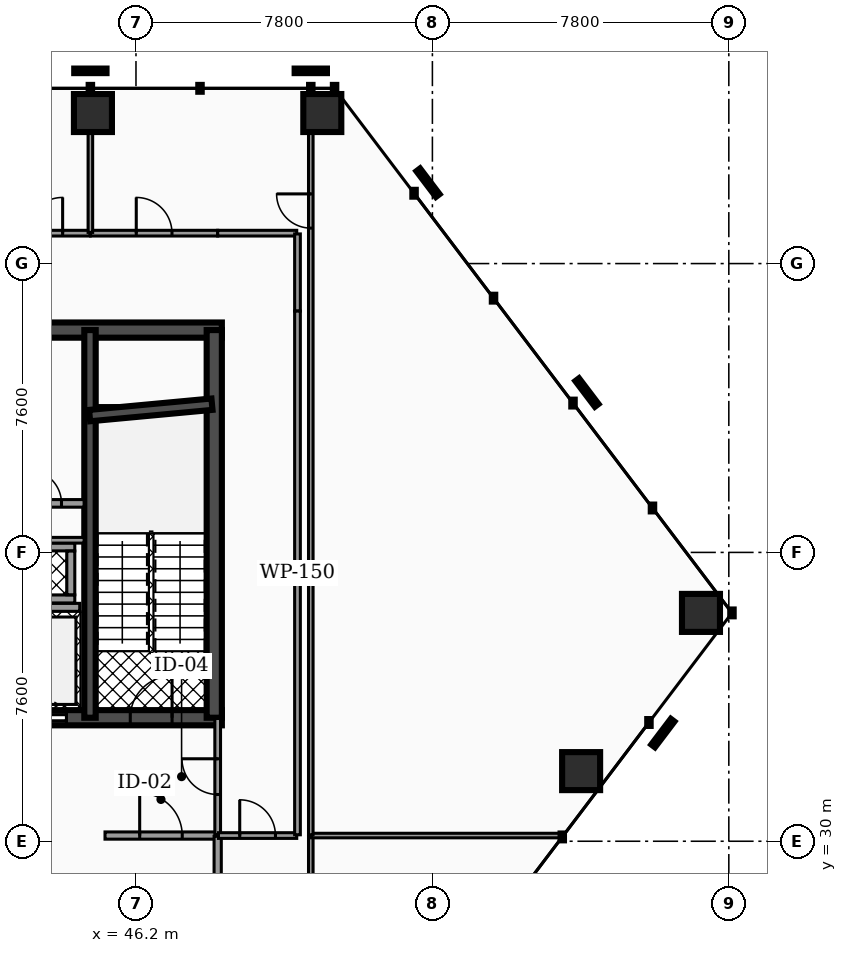
"""IFC4 building model, lengths in metres.
Left out: names, types, materials, properties, quantities, classifications, styles, units other than length and angle.
Written with IfcOpenShell. Run it as: python <this file> out.ifc"""

import sys

from ifc_helpers import new_model, si_unit, direction, frame, frame_2d, origin, origin_2d, place, context, subcontext, project, spatial, rectangle, hollow_rectangle, extrude, element, fill, save


model = new_model("IFC4")
c1 = context("Model", 3, precision=1e-05, world=origin(), true_north=direction((0.0, 1.0)))
c2 = subcontext(c1, "Body", "Model", "MODEL_VIEW")
j1 = project(units=[si_unit("LENGTHUNIT", "METRE"), si_unit("PLANEANGLEUNIT", "RADIAN")], contexts=[c1])
p1 = place(None, origin())
s1 = spatial("IfcSite", under=j1, at=p1, CompositionType="ELEMENT")
p2 = place(p1, origin())
s2 = spatial("IfcBuilding", under=s1, at=p2, CompositionType="ELEMENT")
p3 = place(p2, frame((0.0, 0.0, 68.34)))
s3 = spatial("IfcBuildingStorey", under=s2, at=p3, CompositionType="ELEMENT", Elevation=68.34)
p4 = place(p3, frame((28.4, 43.45, 0.0), z_axis=(0.0, 0.0, 1.0), x_axis=(1.0, 0.0, 0.0)))
e1 = element("IfcWall", 1, at=p4, inside=s3, PredefinedType="SHEAR", context=c2, shape_type="SweptSolid", body=[
    extrude(rectangle(XDim=20.06, YDim=0.4, at=frame_2d((10.03, 0.0))), origin(), (0.0, 0.0, 1.0), 3.82),
])
p5 = place(p3, frame((28.4, 33.25, 0.0), z_axis=(0.0, 0.0, 1.0), x_axis=(1.0, 0.0, 0.0)))
e2 = element("IfcWall", 2, at=p5, inside=s3, PredefinedType="SHEAR", context=c2, shape_type="SweptSolid", body=[
    extrude(rectangle(XDim=20.06, YDim=0.4, at=frame_2d((10.03, 0.0))), origin(), (0.0, 0.0, 1.0), 3.82),
])
p6 = place(p5, frame((4.03, 0.0, 0.0)))
e3 = element("IfcOpeningElement", 3, at=p6, cuts=e2, PredefinedType="OPENING", context=c2, shape_type="SweptSolid", body=[
    extrude(rectangle(XDim=1.1, YDim=2.15, at=frame_2d((0.55, 1.075))), frame((0.0, 0.21, 0.0), z_axis=(0.0, -1.0, 0.0), x_axis=(1.0, 0.0, 0.0)), (0.0, 0.0, 1.0), 0.42),
])
p7 = place(p5, frame((14.87, 0.0, 0.0)))
e4 = element("IfcOpeningElement", 4, at=p7, cuts=e2, PredefinedType="OPENING", context=c2, shape_type="SweptSolid", body=[
    extrude(rectangle(XDim=1.1, YDim=2.15, at=frame_2d((0.55, 1.075))), frame((0.0, 0.21, 0.0), z_axis=(0.0, -1.0, 0.0), x_axis=(1.0, 0.0, 0.0)), (0.0, 0.0, 1.0), 0.42),
])
p8 = place(p5, frame((1.31, 0.0, 0.0)))
e5 = element("IfcOpeningElement", 5, at=p8, cuts=e2, PredefinedType="OPENING", context=c2, shape_type="SweptSolid", body=[
    extrude(rectangle(XDim=1.1, YDim=2.2, at=frame_2d((0.55, 1.1))), frame((0.0, 0.21, 0.0), z_axis=(0.0, -1.0, 0.0), x_axis=(1.0, 0.0, 0.0)), (0.0, 0.0, 1.0), 0.42),
])
p9 = place(p5, frame((9.44, 0.0, 0.0)))
e6 = element("IfcOpeningElement", 6, at=p9, cuts=e2, PredefinedType="OPENING", context=c2, shape_type="SweptSolid", body=[
    extrude(rectangle(XDim=1.12, YDim=2.05, at=frame_2d((0.56, 1.025))), frame((0.0, 0.21, 0.0), z_axis=(0.0, -1.0, 0.0), x_axis=(1.0, 0.0, 0.0)), (0.0, 0.0, 1.0), 0.42),
])
p10 = place(p5, frame((17.65, 0.0, 0.0)))
e7 = element("IfcOpeningElement", 7, at=p10, cuts=e2, PredefinedType="OPENING", context=c2, shape_type="SweptSolid", body=[
    extrude(rectangle(XDim=1.1, YDim=2.2, at=frame_2d((0.55, 1.1))), frame((0.0, 0.21, 0.0), z_axis=(0.0, -1.0, 0.0), x_axis=(1.0, 0.0, 0.0)), (0.0, 0.0, 1.0), 0.42),
])
p11 = place(p3, frame((44.99, 33.25, 0.0), z_axis=(0.0, 0.0, 1.0), x_axis=(0.0, 1.0, 0.0)))
e8 = element("IfcWall", 8, at=p11, inside=s3, PredefinedType="SHEAR", context=c2, shape_type="SweptSolid", body=[
    extrude(rectangle(XDim=10.2, YDim=0.3, at=frame_2d((5.1, 0.0))), origin(), (0.0, 0.0, 1.0), 3.82),
])
p12 = place(p3, frame((48.26, 33.25, 0.0), z_axis=(0.0, 0.0, 1.0), x_axis=(0.0, 1.0, 0.0)))
e9 = element("IfcWall", 9, at=p12, inside=s3, PredefinedType="SHEAR", context=c2, shape_type="SweptSolid", body=[
    extrude(rectangle(XDim=10.2, YDim=0.4, at=frame_2d((5.1, 0.0))), origin(), (0.0, 0.0, 1.0), 3.82),
])
p13 = place(p3, frame((44.98, 41.2, 0.0), z_axis=(0.0, 0.0, 1.0), x_axis=(0.995686468965, 0.09278176286, 0.0)))
e10 = element("IfcWall", 10, at=p13, inside=s3, PredefinedType="SHEAR", context=c2, shape_type="SweptSolid", body=[
    extrude(rectangle(XDim=3.234, YDim=0.3, at=frame_2d((1.617, 0.0))), origin(), (0.0, 0.0, 1.0), 3.82),
])
p14 = place(p3, frame((51.103, 49.161, 0.0), z_axis=(0.091314571576, -0.020299197444, 0.995615182488), x_axis=(0.217002484606, 0.976171051443, 0.0)))
e11 = element("IfcColumn", 11, at=p14, inside=s3, PredefinedType="COLUMN", context=c2, shape_type="SweptSolid", body=[
    extrude(hollow_rectangle(XDim=1.0, YDim=1.0, WallThickness=0.05, at=origin_2d()), origin(), (0.0, 0.0, 1.0), 3.837),
])
p15 = place(p3, frame((45.067, 49.161, 0.0), z_axis=(0.043921338249, -0.020364690264, 0.998827410235), x_axis=(0.42064633694, 0.907224701614, 0.0)))
e12 = element("IfcColumn", 12, at=p15, inside=s3, PredefinedType="COLUMN", context=c2, shape_type="SweptSolid", body=[
    extrude(hollow_rectangle(XDim=1.0, YDim=1.0, WallThickness=0.05, at=origin_2d()), origin(), (0.0, 0.0, 1.0), 3.824),
])
p16 = place(p3, frame((57.914, 31.845, 0.0), z_axis=(-0.001531950294, 0.050873516023, 0.998703929348), x_axis=(-0.999546914037, -0.03009927972, 0.0)))
e13 = element("IfcColumn", 13, at=p16, inside=s3, PredefinedType="COLUMN", context=c2, shape_type="SweptSolid", body=[
    extrude(hollow_rectangle(XDim=1.0, YDim=1.0, WallThickness=0.05, at=origin_2d()), origin(), (0.0, 0.0, 1.0), 3.825),
])
p17 = place(p3, frame((61.067, 36.008, 0.0), z_axis=(0.018031703959, 0.076523238356, 0.996904735491), x_axis=(-0.973342715599, 0.229355527489, 0.0)))
e14 = element("IfcColumn", 14, at=p17, inside=s3, PredefinedType="COLUMN", context=c2, shape_type="SweptSolid", body=[
    extrude(hollow_rectangle(XDim=1.0, YDim=1.0, WallThickness=0.05, at=origin_2d()), origin(), (0.0, 0.0, 1.0), 3.832),
])
p18 = place(p3, frame((42.92, 36.155, 0.0), z_axis=(0.0, 0.0, 1.0), x_axis=(1.0, 0.0, 0.0)))
e15 = element("IfcWall", 15, at=p18, inside=s3, PredefinedType="SOLIDWALL", context=c2, shape_type="SweptSolid", body=[
    extrude(rectangle(XDim=1.8, YDim=0.21, at=frame_2d((0.9, 0.0))), origin(), (0.0, 0.0, 1.0), 2.792),
])
for number, where, z_axis, x_axis in (
    (16, (42.99, 36.375, 0.0), (0.0, 0.0, 1.0), (1.0, 0.0, 0.0)),
    (17, (42.99, 37.745, 0.0), (0.0, 0.0, 1.0), (1.0, 0.0, 0.0)),
):
    element("IfcWall", number, at=place(p3, frame(where, z_axis=z_axis, x_axis=x_axis)), inside=s3, PredefinedType="SOLIDWALL", context=c2, shape_type="SweptSolid", body=[
        extrude(rectangle(XDim=1.6, YDim=0.21, at=frame_2d((0.8, 0.0))), origin(), (0.0, 0.0, 1.0), 3.82),
    ])
p19 = place(p3, frame((44.485, 36.485, 0.0), z_axis=(0.0, 0.0, 1.0), x_axis=(0.0, 1.0, 0.0)))
e18 = element("IfcWall", 18, at=p19, inside=s3, PredefinedType="SOLIDWALL", context=c2, shape_type="SweptSolid", body=[
    extrude(rectangle(XDim=1.15, YDim=0.21, at=frame_2d((0.575, 0.0))), origin(), (0.0, 0.0, 1.0), 3.82),
])
p20 = place(p3, frame((42.765, 38.89, 0.0), z_axis=(0.0, 0.0, 1.0), x_axis=(1.0, 0.0, 0.0)))
e19 = element("IfcWall", 19, at=p20, inside=s3, PredefinedType="PARTITIONING", context=c2, shape_type="SweptSolid", body=[
    extrude(rectangle(XDim=2.07, YDim=0.2, at=frame_2d((1.035, 0.0))), origin(), (0.0, 0.0, 1.0), 2.777),
])
p21 = place(p20, frame((0.595, 0.0, 0.0)))
e20 = element("IfcOpeningElement", 20, at=p21, cuts=e19, PredefinedType="OPENING", context=c2, shape_type="SweptSolid", body=[
    extrude(rectangle(XDim=0.88, YDim=2.05, at=frame_2d((0.44, 1.025))), frame((0.0, 0.11, 0.0), z_axis=(0.0, -1.0, 0.0), x_axis=(1.0, 0.0, 0.0)), (0.0, 0.0, 1.0), 0.22),
])
p22 = place(p3, frame((41.62, 37.92, 0.0), z_axis=(0.0, 0.0, 1.0), x_axis=(1.0, 0.0, 0.0)))
e21 = element("IfcWall", 21, at=p22, inside=s3, PredefinedType="PARTITIONING", context=c2, shape_type="SweptSolid", body=[
    extrude(rectangle(XDim=3.215, YDim=0.15, at=frame_2d((1.607, 0.0))), origin(), (0.0, 0.0, 1.0), 2.777),
])
p23 = place(p22, frame((0.337, 0.0, 0.0)))
e22 = element("IfcOpeningElement", 22, at=p23, cuts=e21, PredefinedType="OPENING", context=c2, shape_type="SweptSolid", body=[
    extrude(rectangle(XDim=0.94, YDim=2.05, at=frame_2d((0.47, 1.025))), frame((0.0, 0.085, 0.0), z_axis=(0.0, -1.0, 0.0), x_axis=(1.0, 0.0, 0.0)), (0.0, 0.0, 1.0), 0.17),
])
p24 = place(p3, frame((45.385, 30.15, 0.0), z_axis=(0.0, 0.0, 1.0), x_axis=(1.0, 0.0, 0.0)))
e23 = element("IfcWall", 23, at=p24, inside=s3, PredefinedType="PARTITIONING", context=c2, shape_type="SweptSolid", body=[
    extrude(rectangle(XDim=2.945, YDim=0.19, at=frame_2d((1.473, 0.0))), origin(), (0.0, 0.0, 1.0), 2.777),
])
p25 = place(p24, frame((0.913, 0.0, 0.0)))
e24 = element("IfcOpeningElement", 24, at=p25, cuts=e23, PredefinedType="OPENING", context=c2, shape_type="SweptSolid", body=[
    extrude(rectangle(XDim=1.12, YDim=2.05, at=frame_2d((0.56, 1.025))), frame((0.0, 0.105, 0.0), z_axis=(0.0, -1.0, 0.0), x_axis=(1.0, 0.0, 0.0)), (0.0, 0.0, 1.0), 0.21),
])
p26 = place(p3, frame((48.35, 30.17, 0.0), z_axis=(0.0, 0.0, 1.0), x_axis=(0.0, 1.0, 0.0)))
e25 = element("IfcWall", 25, at=p26, inside=s3, PredefinedType="PARTITIONING", context=c2, shape_type="SweptSolid", body=[
    extrude(rectangle(XDim=3.06, YDim=0.15, at=frame_2d((1.53, 0.0))), origin(), (0.0, 0.0, 1.0), 2.777),
])
p27 = place(p26, frame((1.06, 0.0, 0.0)))
e26 = element("IfcOpeningElement", 26, at=p27, cuts=e25, PredefinedType="OPENING", context=c2, shape_type="SweptSolid", body=[
    extrude(rectangle(XDim=0.94, YDim=2.05, at=frame_2d((0.47, 1.025))), frame((0.0, 0.085, 0.0), z_axis=(0.0, -1.0, 0.0), x_axis=(1.0, 0.0, 0.0)), (0.0, 0.0, 1.0), 0.17),
])
p28 = place(p3, frame((48.35, 27.37, 0.0), z_axis=(0.0, 0.0, 1.0), x_axis=(0.0, 1.0, 0.0)))
e27 = element("IfcWall", 27, at=p28, inside=s3, PredefinedType="PARTITIONING", context=c2, shape_type="SweptSolid", body=[
    extrude(rectangle(XDim=2.76, YDim=0.19, at=frame_2d((1.38, 0.0))), origin(), (0.0, 0.0, 1.0), 2.777),
])
p29 = place(p3, frame((48.37, 30.15, 0.0), z_axis=(0.0, 0.0, 1.0), x_axis=(1.0, 0.0, 0.0)))
e28 = element("IfcWall", 28, at=p29, inside=s3, PredefinedType="PARTITIONING", context=c2, shape_type="SweptSolid", body=[
    extrude(rectangle(XDim=2.06, YDim=0.15, at=frame_2d((1.03, 0.0))), origin(), (0.0, 0.0, 1.0), 2.777),
])
p30 = place(p29, frame((0.56, 0.0, 0.0)))
e29 = element("IfcOpeningElement", 29, at=p30, cuts=e28, PredefinedType="OPENING", context=c2, shape_type="SweptSolid", body=[
    extrude(rectangle(XDim=0.94, YDim=2.05, at=frame_2d((0.47, 1.025))), frame((0.0, 0.085, 0.0), z_axis=(0.0, -1.0, 0.0), x_axis=(1.0, 0.0, 0.0)), (0.0, 0.0, 1.0), 0.17),
])
p31 = place(p3, frame((45.005, 46.0, 0.0), z_axis=(0.0, 0.0, 1.0), x_axis=(1.0, 0.0, 0.0)))
e30 = element("IfcWall", 30, at=p31, inside=s3, PredefinedType="PARTITIONING", context=c2, shape_type="SweptSolid", body=[
    extrude(rectangle(XDim=3.345, YDim=0.15, at=frame_2d((1.673, 0.0))), origin(), (0.0, 0.0, 1.0), 2.777),
])
p32 = place(p31, frame((1.202, 0.0, 0.0)))
e31 = element("IfcOpeningElement", 31, at=p32, cuts=e30, PredefinedType="OPENING", context=c2, shape_type="SweptSolid", body=[
    extrude(rectangle(XDim=0.94, YDim=2.05, at=frame_2d((0.47, 1.025))), frame((0.0, 0.085, 0.0), z_axis=(0.0, -1.0, 0.0), x_axis=(1.0, 0.0, 0.0)), (0.0, 0.0, 1.0), 0.17),
])
p33 = place(p3, frame((48.35, 46.0, 0.0), z_axis=(0.0, 0.0, 1.0), x_axis=(1.0, 0.0, 0.0)))
e32 = element("IfcWall", 32, at=p33, inside=s3, PredefinedType="PARTITIONING", context=c2, shape_type="SweptSolid", body=[
    extrude(rectangle(XDim=2.08, YDim=0.15, at=frame_2d((1.04, 0.0))), origin(), (0.0, 0.0, 1.0), 2.777),
])
p34 = place(p3, frame((50.45, 43.95, 0.0), z_axis=(0.0, 0.0, 1.0), x_axis=(0.0, 1.0, 0.0)))
e33 = element("IfcWall", 33, at=p34, inside=s3, PredefinedType="PARTITIONING", context=c2, shape_type="SweptSolid", body=[
    extrude(rectangle(XDim=2.03, YDim=0.15, at=frame_2d((1.015, 0.0))), origin(), (0.0, 0.0, 1.0), 2.777),
])
p35 = place(p3, frame((50.45, 30.17, 0.0), z_axis=(0.0, 0.0, 1.0), x_axis=(0.0, 1.0, 0.0)))
e34 = element("IfcWall", 34, at=p35, inside=s3, PredefinedType="PARTITIONING", context=c2, shape_type="SweptSolid", body=[
    extrude(rectangle(XDim=13.78, YDim=0.15, at=frame_2d((6.89, 0.0))), origin(), (0.0, 0.0, 1.0), 2.777),
])
p36 = place(p3, frame((42.605, 46.0, 0.0), z_axis=(0.0, 0.0, 1.0), x_axis=(1.0, 0.0, 0.0)))
e35 = element("IfcWall", 35, at=p36, inside=s3, PredefinedType="PARTITIONING", context=c2, shape_type="SweptSolid", body=[
    extrude(rectangle(XDim=2.39, YDim=0.15, at=frame_2d((1.195, 0.0))), origin(), (0.0, 0.0, 1.0), 2.777),
])
p37 = place(p36, frame((0.725, 0.0, 0.0)))
e36 = element("IfcOpeningElement", 36, at=p37, cuts=e35, PredefinedType="OPENING", context=c2, shape_type="SweptSolid", body=[
    extrude(rectangle(XDim=0.94, YDim=2.05, at=frame_2d((0.47, 1.025))), frame((0.0, 0.085, 0.0), z_axis=(0.0, -1.0, 0.0), x_axis=(1.0, 0.0, 0.0)), (0.0, 0.0, 1.0), 0.17),
])
p38 = place(p3, frame((50.8, 21.394, 0.0), z_axis=(0.0, 0.0, 1.0), x_axis=(0.0, 1.0, 0.0)))
e37 = element("IfcWall", 37, at=p38, inside=s3, PredefinedType="PARTITIONING", context=c2, shape_type="SweptSolid", body=[
    extrude(rectangle(XDim=8.736, YDim=0.12, at=frame_2d((4.368, 0.0))), origin(), (0.0, 0.0, 1.0), 2.777),
])
p39 = place(p38, frame((4.118, 0.0, 0.0)))
e38 = element("IfcOpeningElement", 38, at=p39, cuts=e37, PredefinedType="OPENING", context=c2, shape_type="SweptSolid", body=[
    extrude(rectangle(XDim=0.9, YDim=2.05, at=frame_2d((0.45, 1.025))), frame((0.0, 0.07, 0.0), z_axis=(0.0, -1.0, 0.0), x_axis=(1.0, 0.0, 0.0)), (0.0, 0.0, 1.0), 0.14),
])
p40 = place(p3, frame((50.82, 30.15, 0.0), z_axis=(0.0, 0.0, 1.0), x_axis=(1.0, 0.0, 0.0)))
e39 = element("IfcWall", 39, at=p40, inside=s3, PredefinedType="PARTITIONING", context=c2, shape_type="SweptSolid", body=[
    extrude(rectangle(XDim=6.61, YDim=0.12, at=frame_2d((3.305, 0.0))), origin(), (0.0, 0.0, 1.0), 2.777),
])
p41 = place(p3, frame((50.8, 30.17, 0.0), z_axis=(0.0, 0.0, 1.0), x_axis=(0.0, 1.0, 0.0)))
e40 = element("IfcWall", 40, at=p41, inside=s3, PredefinedType="PARTITIONING", context=c2, shape_type="SweptSolid", body=[
    extrude(rectangle(XDim=19.626, YDim=0.12, at=frame_2d((9.813, 0.0))), origin(), (0.0, 0.0, 1.0), 2.777),
])
p42 = place(p41, frame((15.963, 0.0, 0.0)))
e41 = element("IfcOpeningElement", 41, at=p42, cuts=e40, PredefinedType="OPENING", context=c2, shape_type="SweptSolid", body=[
    extrude(rectangle(XDim=0.9, YDim=2.05, at=frame_2d((0.45, 1.025))), frame((0.0, 0.07, 0.0), z_axis=(0.0, -1.0, 0.0), x_axis=(1.0, 0.0, 0.0)), (0.0, 0.0, 1.0), 0.14),
])
p43 = place(p3, frame((45.0, 46.02, 0.0), z_axis=(0.0, 0.0, 1.0), x_axis=(0.0, 1.0, 0.0)))
e42 = element("IfcWall", 42, at=p43, inside=s3, PredefinedType="PARTITIONING", context=c2, shape_type="SweptSolid", body=[
    extrude(rectangle(XDim=3.776, YDim=0.12, at=frame_2d((1.888, 0.0))), origin(), (0.0, 0.0, 1.0), 2.777),
])
p44 = place(p7, origin())
e43 = element("IfcDoor", 43, at=p44, inside=s3, OperationType="SLIDING_TO_RIGHT", PredefinedType="DOOR", context=c2, shape_type="SweptSolid", body=[
    extrude(rectangle(XDim=1.1, YDim=2.15, at=frame_2d((0.55, 1.075))), frame((0.0, 0.025, 0.0), z_axis=(0.0, -1.0, 0.0), x_axis=(1.0, 0.0, 0.0)), (0.0, 0.0, 1.0), 0.05),
])
fill(e4, e43)
p45 = place(p10, origin())
e44 = element("IfcDoor", 44, at=p45, inside=s3, OperationType="SINGLE_SWING_RIGHT", PredefinedType="DOOR", context=c2, shape_type="SweptSolid", body=[
    extrude(rectangle(XDim=1.1, YDim=2.2, at=frame_2d((0.55, 1.1))), frame((0.0, 0.025, 0.0), z_axis=(0.0, -1.0, 0.0), x_axis=(1.0, 0.0, 0.0)), (0.0, 0.0, 1.0), 0.05),
])
fill(e7, e44)
p46 = place(p21, origin())
e45 = element("IfcDoor", 45, at=p46, inside=s3, OperationType="SINGLE_SWING_LEFT", PredefinedType="DOOR", context=c2, shape_type="SweptSolid", body=[
    extrude(rectangle(XDim=0.88, YDim=2.05, at=frame_2d((0.44, 1.025))), frame((0.0, 0.025, 0.0), z_axis=(0.0, -1.0, 0.0), x_axis=(1.0, 0.0, 0.0)), (0.0, 0.0, 1.0), 0.05),
])
fill(e20, e45)
p47 = place(p25, origin())
e46 = element("IfcDoor", 46, at=p47, inside=s3, OperationType="SINGLE_SWING_LEFT", PredefinedType="DOOR", context=c2, shape_type="SweptSolid", body=[
    extrude(rectangle(XDim=1.12, YDim=2.05, at=frame_2d((0.56, 1.025))), frame((0.0, 0.025, 0.0), z_axis=(0.0, -1.0, 0.0), x_axis=(1.0, 0.0, 0.0)), (0.0, 0.0, 1.0), 0.05),
])
fill(e24, e46)
p48 = place(p27, origin())
e47 = element("IfcDoor", 47, at=p48, inside=s3, OperationType="SINGLE_SWING_RIGHT", PredefinedType="DOOR", context=c2, shape_type="SweptSolid", body=[
    extrude(rectangle(XDim=0.94, YDim=2.05, at=frame_2d((0.47, 1.025))), frame((0.0, 0.025, 0.0), z_axis=(0.0, -1.0, 0.0), x_axis=(1.0, 0.0, 0.0)), (0.0, 0.0, 1.0), 0.05),
])
fill(e26, e47)
p49 = place(p30, origin())
e48 = element("IfcDoor", 48, at=p49, inside=s3, OperationType="SINGLE_SWING_LEFT", PredefinedType="DOOR", context=c2, shape_type="SweptSolid", body=[
    extrude(rectangle(XDim=0.94, YDim=2.05, at=frame_2d((0.47, 1.025))), frame((0.0, 0.025, 0.0), z_axis=(0.0, -1.0, 0.0), x_axis=(1.0, 0.0, 0.0)), (0.0, 0.0, 1.0), 0.05),
])
fill(e29, e48)
p50 = place(p32, origin())
e49 = element("IfcDoor", 49, at=p50, inside=s3, OperationType="SINGLE_SWING_LEFT", PredefinedType="DOOR", context=c2, shape_type="SweptSolid", body=[
    extrude(rectangle(XDim=0.94, YDim=2.05, at=frame_2d((0.47, 1.025))), frame((0.0, 0.025, 0.0), z_axis=(0.0, -1.0, 0.0), x_axis=(1.0, 0.0, 0.0)), (0.0, 0.0, 1.0), 0.05),
])
fill(e31, e49)
p51 = place(p37, origin())
e50 = element("IfcDoor", 50, at=p51, inside=s3, OperationType="SINGLE_SWING_RIGHT", PredefinedType="DOOR", context=c2, shape_type="SweptSolid", body=[
    extrude(rectangle(XDim=0.94, YDim=2.05, at=frame_2d((0.47, 1.025))), frame((0.0, 0.025, 0.0), z_axis=(0.0, -1.0, 0.0), x_axis=(1.0, 0.0, 0.0)), (0.0, 0.0, 1.0), 0.05),
])
fill(e36, e50)
p52 = place(p42, origin())
e51 = element("IfcDoor", 51, at=p52, inside=s3, OperationType="SINGLE_SWING_RIGHT", PredefinedType="DOOR", context=c2, shape_type="SweptSolid", body=[
    extrude(rectangle(XDim=0.9, YDim=2.05, at=frame_2d((0.45, 1.025))), frame((0.0, 0.025, 0.0), z_axis=(0.0, -1.0, 0.0), x_axis=(1.0, 0.0, 0.0)), (0.0, 0.0, 1.0), 0.05),
])
fill(e41, e51)
save(model, sys.argv[1])
